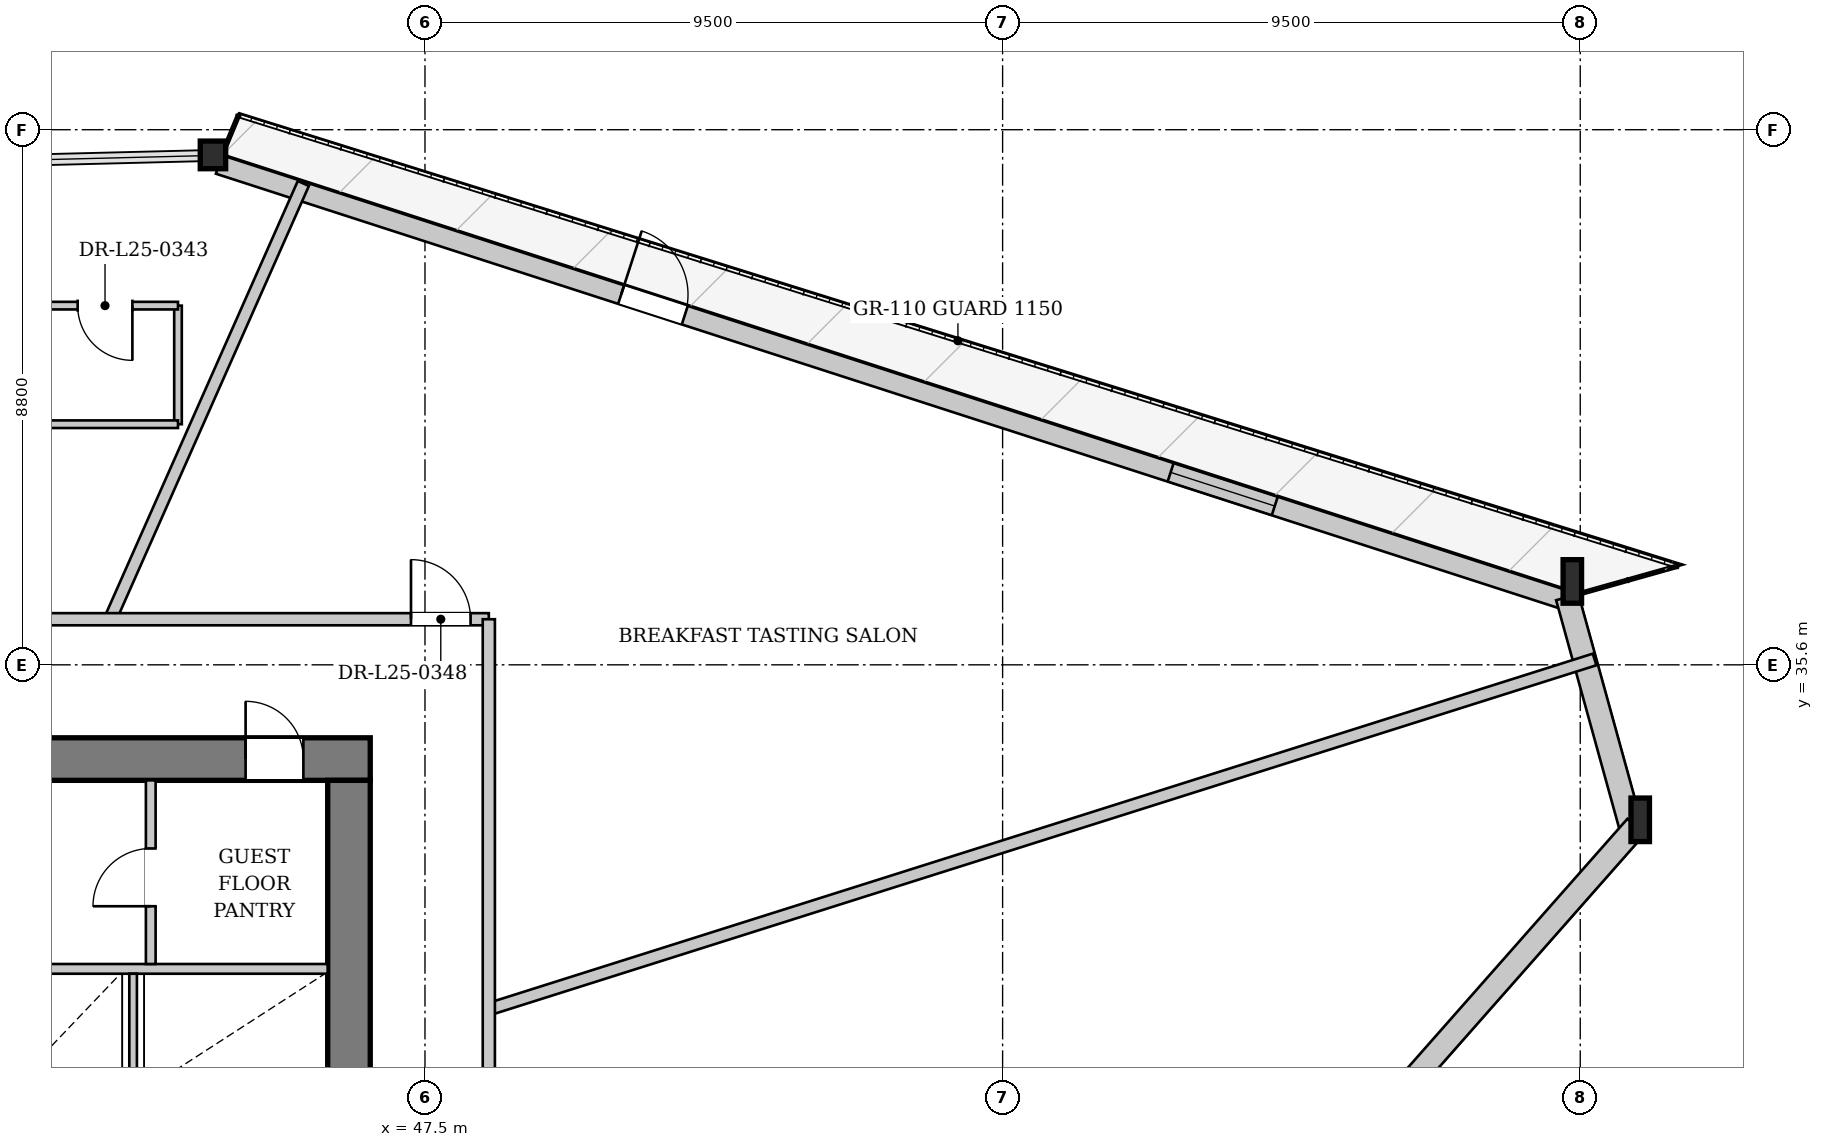
"""IFC4 building model, lengths in metres.
Left out: names, types, materials, properties, quantities, classifications, styles, units other than length and angle.
Written with IfcOpenShell. Run it as: python <this file> out.ifc"""

import sys

from ifc_helpers import new_model, si_unit, direction, frame, frame_2d, origin, origin_2d, place, context, subcontext, project, spatial, rectangle, i_section, extrude, source, transform, mapped, element, fill, save


model = new_model("IFC4")
c1 = context("Model", 3, precision=1e-05, world=origin(), true_north=direction((0.0, 1.0)))
c2 = subcontext(c1, "Body", "Model", "MODEL_VIEW")
j1 = project(units=[si_unit("LENGTHUNIT", "METRE"), si_unit("PLANEANGLEUNIT", "RADIAN")], contexts=[c1])
p1 = place(None, origin())
s1 = spatial("IfcSite", under=j1, at=p1, CompositionType="ELEMENT")
p2 = place(p1, origin())
s2 = spatial("IfcBuilding", under=s1, at=p2, CompositionType="ELEMENT")
p3 = place(p2, frame((0.0, 0.0, 98.6)))
s3 = spatial("IfcBuildingStorey", under=s2, at=p3, CompositionType="ELEMENT", Elevation=98.6)
m1 = source(origin(), c2, "Body", "SweptSolid", [
    extrude(i_section(OverallWidth=0.304, OverallDepth=0.716, WebThickness=0.021, FlangeThickness=0.04, at=origin_2d()), origin(), (0.0, 0.0, 1.0), 3.421),
])
p4 = place(p3, frame((67.561, 32.817, 0.0), z_axis=(-0.043537632385, 0.137179228596, 0.989588972154), x_axis=(-0.953146965956, -0.302507621869, 0.0)))
e1 = element("IfcColumn", 1, at=p4, inside=s3, PredefinedType="COLUMN", context=c2, shape_type="MappedRepresentation", body=[
    mapped(m1, transform((0.0, 0.0, 0.0), x_axis=(1.0, 0.0, 0.0), y_axis=(0.0, 1.0, 0.0), z_axis=(0.0, 0.0, 1.0), scale=1.0)),
])
m2 = source(origin(), c2, "Body", "SweptSolid", [
    extrude(i_section(OverallWidth=0.304, OverallDepth=0.716, WebThickness=0.021, FlangeThickness=0.04, at=origin_2d()), origin(), (0.0, 0.0, 1.0), 3.416),
])
p5 = place(p3, frame((66.47, 36.764, 0.0), z_axis=(-0.058530529393, 0.121420475506, 0.990873980513), x_axis=(-0.900802013123, -0.43423004635, 0.0)))
e2 = element("IfcColumn", 2, at=p5, inside=s3, PredefinedType="COLUMN", context=c2, shape_type="MappedRepresentation", body=[
    mapped(m2, transform((0.0, 0.0, 0.0), x_axis=(1.0, 0.0, 0.0), y_axis=(0.0, 1.0, 0.0), z_axis=(0.0, 0.0, 1.0), scale=1.0)),
])
m3 = source(origin(), c2, "Body", "SweptSolid", [
    extrude(i_section(OverallWidth=0.418, OverallDepth=0.455, WebThickness=0.038, FlangeThickness=0.059, at=origin_2d()), origin(), (0.0, 0.0, 1.0), 3.398),
])
p6 = place(p3, frame((44.16, 43.981, 0.0), z_axis=(-0.086440081787, 0.003017858217, 0.996252480445), x_axis=(-0.034891460117, -0.999391107631, 0.0)))
e3 = element("IfcColumn", 3, at=p6, inside=s3, PredefinedType="COLUMN", context=c2, shape_type="MappedRepresentation", body=[
    mapped(m3, transform((0.0, 0.0, 0.0), x_axis=(1.0, 0.0, 0.0), y_axis=(0.0, 1.0, 0.0), z_axis=(0.0, 0.0, 1.0), scale=1.0)),
])
p7 = place(p3, frame((44.111, 43.829, 0.0), z_axis=(0.0, 0.0, 1.0), x_axis=(0.951457074242, -0.307781474224, 0.0)))
e4 = element("IfcWall", 4, at=p7, inside=s3, PredefinedType="SOLIDWALL", context=c2, shape_type="SweptSolid", body=[
    extrude(rectangle(XDim=23.448, YDim=0.32, at=frame_2d((11.724, 0.0))), origin(), (0.0, 0.0, 1.0), 2.692),
])
p8 = place(p7, frame((6.953, 0.0, 0.0)))
e5 = element("IfcOpeningElement", 5, at=p8, cuts=e4, PredefinedType="OPENING", context=c2, shape_type="SweptSolid", body=[
    extrude(rectangle(XDim=1.1, YDim=2.3, at=frame_2d((0.55, 1.15))), frame((0.0, 0.17, 0.0), z_axis=(0.0, -1.0, 0.0), x_axis=(1.0, 0.0, 0.0)), (0.0, 0.0, 1.0), 0.34),
])
p9 = place(p7, frame((16.451, 0.0, 0.372)))
e6 = element("IfcOpeningElement", 6, at=p9, cuts=e4, PredefinedType="OPENING", context=c2, shape_type="SweptSolid", body=[
    extrude(rectangle(XDim=1.8, YDim=2.2, at=frame_2d((0.9, 1.1))), frame((0.0, 0.17, 0.0), z_axis=(0.0, -1.0, 0.0), x_axis=(1.0, 0.0, 0.0)), (0.0, 0.0, 1.0), 0.34),
])
p10 = place(p3, frame((66.287, 36.713, 0.0), z_axis=(0.0, 0.0, 1.0), x_axis=(0.266419915457, -0.963857058203, 0.0)))
e7 = element("IfcWall", 7, at=p10, inside=s3, PredefinedType="SOLIDWALL", context=c2, shape_type="SweptSolid", body=[
    extrude(rectangle(XDim=4.095, YDim=0.38, at=frame_2d((2.048, 0.0))), origin(), (0.0, 0.0, 1.0), 2.692),
])
p11 = place(p3, frame((67.418, 32.942, 0.0), z_axis=(0.0, 0.0, 1.0), x_axis=(-0.661521919695, -0.749925829508, 0.0)))
e8 = element("IfcWall", 8, at=p11, inside=s3, PredefinedType="SOLIDWALL", context=c2, shape_type="SweptSolid", body=[
    extrude(rectangle(XDim=24.051, YDim=0.38, at=frame_2d((12.026, 0.0))), origin(), (0.0, 0.0, 1.0), 2.692),
])
p12 = place(p11, frame((6.134, 0.0, 0.65)))
e9 = element("IfcOpeningElement", 9, at=p12, cuts=e8, PredefinedType="OPENING", context=c2, shape_type="SweptSolid", body=[
    extrude(rectangle(XDim=1.2, YDim=1.5, at=frame_2d((0.6, 0.75))), frame((0.0, 0.2, 0.0), z_axis=(0.0, -1.0, 0.0), x_axis=(1.0, 0.0, 0.0)), (0.0, 0.0, 1.0), 0.4),
])
p13 = place(p11, frame((16.717, 0.0, 0.65)))
e10 = element("IfcOpeningElement", 10, at=p13, cuts=e8, PredefinedType="OPENING", context=c2, shape_type="SweptSolid", body=[
    extrude(rectangle(XDim=1.2, YDim=1.5, at=frame_2d((0.6, 0.75))), frame((0.0, 0.2, 0.0), z_axis=(0.0, -1.0, 0.0), x_axis=(1.0, 0.0, 0.0)), (0.0, 0.0, 1.0), 0.4),
])
p14 = place(p3, frame((29.4, 34.05, 0.0), z_axis=(0.0, 0.0, 1.0), x_axis=(1.0, 0.0, 0.0)))
e11 = element("IfcWall", 11, at=p14, inside=s3, PredefinedType="SHEAR", context=c2, shape_type="SweptSolid", body=[
    extrude(rectangle(XDim=17.2, YDim=0.7, at=frame_2d((8.6, 0.0))), origin(), (0.0, 0.0, 1.0), 3.3),
])
p15 = place(p14, frame((1.7, 0.0, 0.0)))
e12 = element("IfcOpeningElement", 12, at=p15, cuts=e11, PredefinedType="OPENING", context=c2, shape_type="SweptSolid", body=[
    extrude(rectangle(XDim=0.95, YDim=2.1, at=frame_2d((0.475, 1.05))), frame((0.0, 0.36, 0.0), z_axis=(0.0, -1.0, 0.0), x_axis=(1.0, 0.0, 0.0)), (0.0, 0.0, 1.0), 0.72),
])
p16 = place(p14, frame((4.08, 0.0, 0.0)))
e13 = element("IfcOpeningElement", 13, at=p16, cuts=e11, PredefinedType="OPENING", context=c2, shape_type="SweptSolid", body=[
    extrude(rectangle(XDim=1.32, YDim=2.2, at=frame_2d((0.66, 1.1))), frame((0.0, 0.36, 0.0), z_axis=(0.0, -1.0, 0.0), x_axis=(1.0, 0.0, 0.0)), (0.0, 0.0, 1.0), 0.72),
])
p17 = place(p14, frame((15.15, 0.0, 0.0)))
e14 = element("IfcOpeningElement", 14, at=p17, cuts=e11, PredefinedType="OPENING", context=c2, shape_type="SweptSolid", body=[
    extrude(rectangle(XDim=0.95, YDim=2.1, at=frame_2d((0.475, 1.05))), frame((0.0, 0.36, 0.0), z_axis=(0.0, -1.0, 0.0), x_axis=(1.0, 0.0, 0.0)), (0.0, 0.0, 1.0), 0.72),
])
p18 = place(p3, frame((46.25, 33.7, 0.0), z_axis=(0.0, 0.0, 1.0), x_axis=(0.0, -1.0, 0.0)))
e15 = element("IfcWall", 15, at=p18, inside=s3, PredefinedType="SHEAR", context=c2, shape_type="SweptSolid", body=[
    extrude(rectangle(XDim=14.2, YDim=0.7, at=frame_2d((7.1, 0.0))), origin(), (0.0, 0.0, 1.0), 3.3),
])
p19 = place(p18, frame((5.18, 0.0, 0.0)))
e16 = element("IfcOpeningElement", 16, at=p19, cuts=e15, PredefinedType="OPENING", context=c2, shape_type="SweptSolid", body=[
    extrude(rectangle(XDim=1.6, YDim=2.2, at=frame_2d((0.8, 1.1))), frame((0.0, 0.36, 0.0), z_axis=(0.0, -1.0, 0.0), x_axis=(1.0, 0.0, 0.0)), (0.0, 0.0, 1.0), 0.72),
])
p20 = place(p3, frame((40.72, 30.6, 0.0), z_axis=(0.0, 0.0, 1.0), x_axis=(1.0, 0.0, 0.0)))
e17 = element("IfcWall", 17, at=p20, inside=s3, PredefinedType="PARTITIONING", context=c2, shape_type="SweptSolid", body=[
    extrude(rectangle(XDim=5.18, YDim=0.16, at=frame_2d((2.59, 0.0))), origin(), (0.0, 0.0, 1.0), 3.3),
])
p21 = place(p3, frame((42.7, 28.6, 0.0), z_axis=(0.0, 0.0, 1.0), x_axis=(0.0, 1.0, 0.0)))
e18 = element("IfcWall", 18, at=p21, inside=s3, PredefinedType="PARTITIONING", context=c2, shape_type="SweptSolid", body=[
    extrude(rectangle(XDim=1.92, YDim=0.125, at=frame_2d((0.96, 0.0))), origin(), (0.0, 0.0, 1.0), 3.3),
])
p22 = place(p3, frame((42.99, 30.68, 0.0), z_axis=(0.0, 0.0, 1.0), x_axis=(0.0, 1.0, 0.0)))
e19 = element("IfcWall", 19, at=p22, inside=s3, PredefinedType="PARTITIONING", context=c2, shape_type="SweptSolid", body=[
    extrude(rectangle(XDim=3.02, YDim=0.16, at=frame_2d((1.51, 0.0))), origin(), (0.0, 0.0, 1.0), 3.3),
])
p23 = place(p22, frame((0.95, 0.0, 0.0)))
e20 = element("IfcOpeningElement", 20, at=p23, cuts=e19, PredefinedType="OPENING", context=c2, shape_type="SweptSolid", body=[
    extrude(rectangle(XDim=0.95, YDim=2.1, at=frame_2d((0.475, 1.05))), frame((0.0, 0.09, 0.0), z_axis=(0.0, -1.0, 0.0), x_axis=(1.0, 0.0, 0.0)), (0.0, 0.0, 1.0), 0.18),
])
p24 = place(p3, frame((48.55, 29.937, 0.0), z_axis=(0.0, 0.0, 1.0), x_axis=(0.953449672839, 0.301552186798, 0.0)))
e21 = element("IfcWall", 21, at=p24, inside=s3, PredefinedType="PARTITIONING", context=c2, shape_type="SweptSolid", body=[
    extrude(rectangle(XDim=19.074, YDim=0.2, at=frame_2d((9.537, 0.0))), origin(), (0.0, 0.0, 1.0), 3.3),
])
p25 = place(p3, frame((42.323, 36.35, 0.0), z_axis=(0.0, 0.0, 1.0), x_axis=(0.40528287346, 0.914191332534, 0.0)))
e22 = element("IfcWall", 22, at=p25, inside=s3, PredefinedType="PARTITIONING", context=c2, shape_type="SweptSolid", body=[
    extrude(rectangle(XDim=7.838, YDim=0.2, at=frame_2d((3.919, 0.0))), origin(), (0.0, 0.0, 1.0), 3.3),
])
p26 = place(p3, frame((43.438, 39.557, 0.0), z_axis=(0.0, 0.0, 1.0), x_axis=(0.0, 1.0, 0.0)))
e23 = element("IfcWall", 23, at=p26, inside=s3, PredefinedType="PARTITIONING", context=c2, shape_type="SweptSolid", body=[
    extrude(rectangle(XDim=1.95, YDim=0.125, at=frame_2d((0.975, 0.0))), origin(), (0.0, 0.0, 1.0), 3.3),
])
p27 = place(p3, frame((43.438, 41.507, 0.0), z_axis=(0.0, 0.0, 1.0), x_axis=(-1.0, 0.0, 0.0)))
e24 = element("IfcWall", 24, at=p27, inside=s3, PredefinedType="PARTITIONING", context=c2, shape_type="SweptSolid", body=[
    extrude(rectangle(XDim=2.4, YDim=0.125, at=frame_2d((1.2, 0.0))), origin(), (0.0, 0.0, 1.0), 3.3),
])
p28 = place(p27, frame((0.75, 0.0, 0.0)))
e25 = element("IfcOpeningElement", 25, at=p28, cuts=e24, PredefinedType="OPENING", context=c2, shape_type="SweptSolid", body=[
    extrude(rectangle(XDim=0.9, YDim=2.1, at=frame_2d((0.45, 1.05))), frame((0.0, 0.073, 0.0), z_axis=(0.0, -1.0, 0.0), x_axis=(1.0, 0.0, 0.0)), (0.0, 0.0, 1.0), 0.145),
])
p29 = place(p3, frame((41.038, 39.557, 0.0), z_axis=(0.0, 0.0, 1.0), x_axis=(1.0, 0.0, 0.0)))
e26 = element("IfcWall", 26, at=p29, inside=s3, PredefinedType="PARTITIONING", context=c2, shape_type="SweptSolid", body=[
    extrude(rectangle(XDim=2.4, YDim=0.125, at=frame_2d((1.2, 0.0))), origin(), (0.0, 0.0, 1.0), 2.985),
])
p30 = place(p3, frame((27.45, 36.35, 0.0), z_axis=(0.0, 0.0, 1.0), x_axis=(1.0, 0.0, 0.0)))
e27 = element("IfcWall", 27, at=p30, inside=s3, PredefinedType="PARTITIONING", context=c2, shape_type="SweptSolid", body=[
    extrude(rectangle(XDim=21.1, YDim=0.2, at=frame_2d((10.55, 0.0))), origin(), (0.0, 0.0, 1.0), 3.3),
])
p31 = place(p30, frame((19.82, 0.0, 0.0)))
e28 = element("IfcOpeningElement", 28, at=p31, cuts=e27, PredefinedType="OPENING", context=c2, shape_type="SweptSolid", body=[
    extrude(rectangle(XDim=0.98, YDim=2.15, at=frame_2d((0.49, 1.075))), frame((0.0, 0.11, 0.0), z_axis=(0.0, -1.0, 0.0), x_axis=(1.0, 0.0, 0.0)), (0.0, 0.0, 1.0), 0.22),
])
p32 = place(p30, frame((8.782, 0.0, 0.0)))
e29 = element("IfcOpeningElement", 29, at=p32, cuts=e27, PredefinedType="OPENING", context=c2, shape_type="SweptSolid", body=[
    extrude(rectangle(XDim=0.98, YDim=2.15, at=frame_2d((0.49, 1.075))), frame((0.0, 0.11, 0.0), z_axis=(0.0, -1.0, 0.0), x_axis=(1.0, 0.0, 0.0)), (0.0, 0.0, 1.0), 0.22),
])
p33 = place(p3, frame((48.55, 16.85, 0.0), z_axis=(0.0, 0.0, 1.0), x_axis=(0.0, 1.0, 0.0)))
e30 = element("IfcWall", 30, at=p33, inside=s3, PredefinedType="PARTITIONING", context=c2, shape_type="SweptSolid", body=[
    extrude(rectangle(XDim=19.5, YDim=0.2, at=frame_2d((9.75, 0.0))), origin(), (0.0, 0.0, 1.0), 3.3),
])
p34 = place(p33, frame((7.746, 0.0, 0.0)))
e31 = element("IfcOpeningElement", 31, at=p34, cuts=e30, PredefinedType="OPENING", context=c2, shape_type="SweptSolid", body=[
    extrude(rectangle(XDim=0.98, YDim=2.15, at=frame_2d((0.49, 1.075))), frame((0.0, 0.11, 0.0), z_axis=(0.0, -1.0, 0.0), x_axis=(1.0, 0.0, 0.0)), (0.0, 0.0, 1.0), 0.22),
])
m4 = source(origin(), c2, "Body", "SweptSolid", [
    extrude(rectangle(XDim=1.1, YDim=2.3, at=frame_2d((0.55, 1.15))), frame((0.0, 0.025, 0.0), z_axis=(0.0, -1.0, 0.0), x_axis=(1.0, 0.0, 0.0)), (0.0, 0.0, 1.0), 0.05),
])
p35 = place(p8, origin())
e32 = element("IfcDoor", 32, at=p35, inside=s3, OperationType="SINGLE_SWING_LEFT", PredefinedType="DOOR", context=c2, shape_type="MappedRepresentation", body=[
    mapped(m4, transform((0.0, 0.0, 0.0), x_axis=(1.0, 0.0, 0.0), y_axis=(0.0, 1.0, 0.0), z_axis=(0.0, 0.0, 1.0), scale=1.0)),
])
fill(e5, e32)
m5 = source(origin(), c2, "Body", "SweptSolid", [
    extrude(rectangle(XDim=1.8, YDim=2.2, at=frame_2d((0.9, 1.1))), frame((0.0, 0.03, 0.0), z_axis=(0.0, -1.0, 0.0), x_axis=(1.0, 0.0, 0.0)), (0.0, 0.0, 1.0), 0.06),
])
p36 = place(p9, origin())
e33 = element("IfcWindow", 33, at=p36, inside=s3, PartitioningType="SINGLE_PANEL", PredefinedType="WINDOW", context=c2, shape_type="MappedRepresentation", body=[
    mapped(m5, transform((0.0, 0.0, 0.0), x_axis=(1.0, 0.0, 0.0), y_axis=(0.0, 1.0, 0.0), z_axis=(0.0, 0.0, 1.0), scale=1.0)),
])
fill(e6, e33)
m6 = source(origin(), c2, "Body", "SweptSolid", [
    extrude(rectangle(XDim=0.95, YDim=2.1, at=frame_2d((0.475, 1.05))), frame((0.0, 0.025, 0.0), z_axis=(0.0, -1.0, 0.0), x_axis=(1.0, 0.0, 0.0)), (0.0, 0.0, 1.0), 0.05),
])
p37 = place(p23, origin())
e34 = element("IfcDoor", 34, at=p37, inside=s3, OperationType="SINGLE_SWING_LEFT", PredefinedType="DOOR", context=c2, shape_type="MappedRepresentation", body=[
    mapped(m6, transform((0.0, 0.0, 0.0), x_axis=(1.0, 0.0, 0.0), y_axis=(0.0, 1.0, 0.0), z_axis=(0.0, 0.0, 1.0), scale=1.0)),
])
fill(e20, e34)
p38 = place(p17, origin())
e35 = element("IfcDoor", 35, at=p38, inside=s3, OperationType="SINGLE_SWING_LEFT", PredefinedType="DOOR", context=c2, shape_type="MappedRepresentation", body=[
    mapped(m6, transform((0.0, 0.0, 0.0), x_axis=(1.0, 0.0, 0.0), y_axis=(0.0, 1.0, 0.0), z_axis=(0.0, 0.0, 1.0), scale=1.0)),
])
fill(e14, e35)
m7 = source(origin(), c2, "Body", "SweptSolid", [
    extrude(rectangle(XDim=0.9, YDim=2.1, at=frame_2d((0.45, 1.05))), frame((0.0, 0.025, 0.0), z_axis=(0.0, -1.0, 0.0), x_axis=(1.0, 0.0, 0.0)), (0.0, 0.0, 1.0), 0.05),
])
p39 = place(p28, origin())
e36 = element("IfcDoor", 36, at=p39, inside=s3, OperationType="SINGLE_SWING_LEFT", PredefinedType="DOOR", context=c2, shape_type="MappedRepresentation", body=[
    mapped(m7, transform((0.0, 0.0, 0.0), x_axis=(1.0, 0.0, 0.0), y_axis=(0.0, 1.0, 0.0), z_axis=(0.0, 0.0, 1.0), scale=1.0)),
])
fill(e25, e36)
m8 = source(origin(), c2, "Body", "SweptSolid", [
    extrude(rectangle(XDim=0.98, YDim=2.15, at=frame_2d((0.49, 1.075))), frame((0.0, 0.025, 0.0), z_axis=(0.0, -1.0, 0.0), x_axis=(1.0, 0.0, 0.0)), (0.0, 0.0, 1.0), 0.05),
])
p40 = place(p31, origin())
e37 = element("IfcDoor", 37, at=p40, inside=s3, OperationType="SINGLE_SWING_LEFT", PredefinedType="DOOR", context=c2, shape_type="MappedRepresentation", body=[
    mapped(m8, transform((0.0, 0.0, 0.0), x_axis=(1.0, 0.0, 0.0), y_axis=(0.0, 1.0, 0.0), z_axis=(0.0, 0.0, 1.0), scale=1.0)),
])
fill(e28, e37)
save(model, sys.argv[1])
